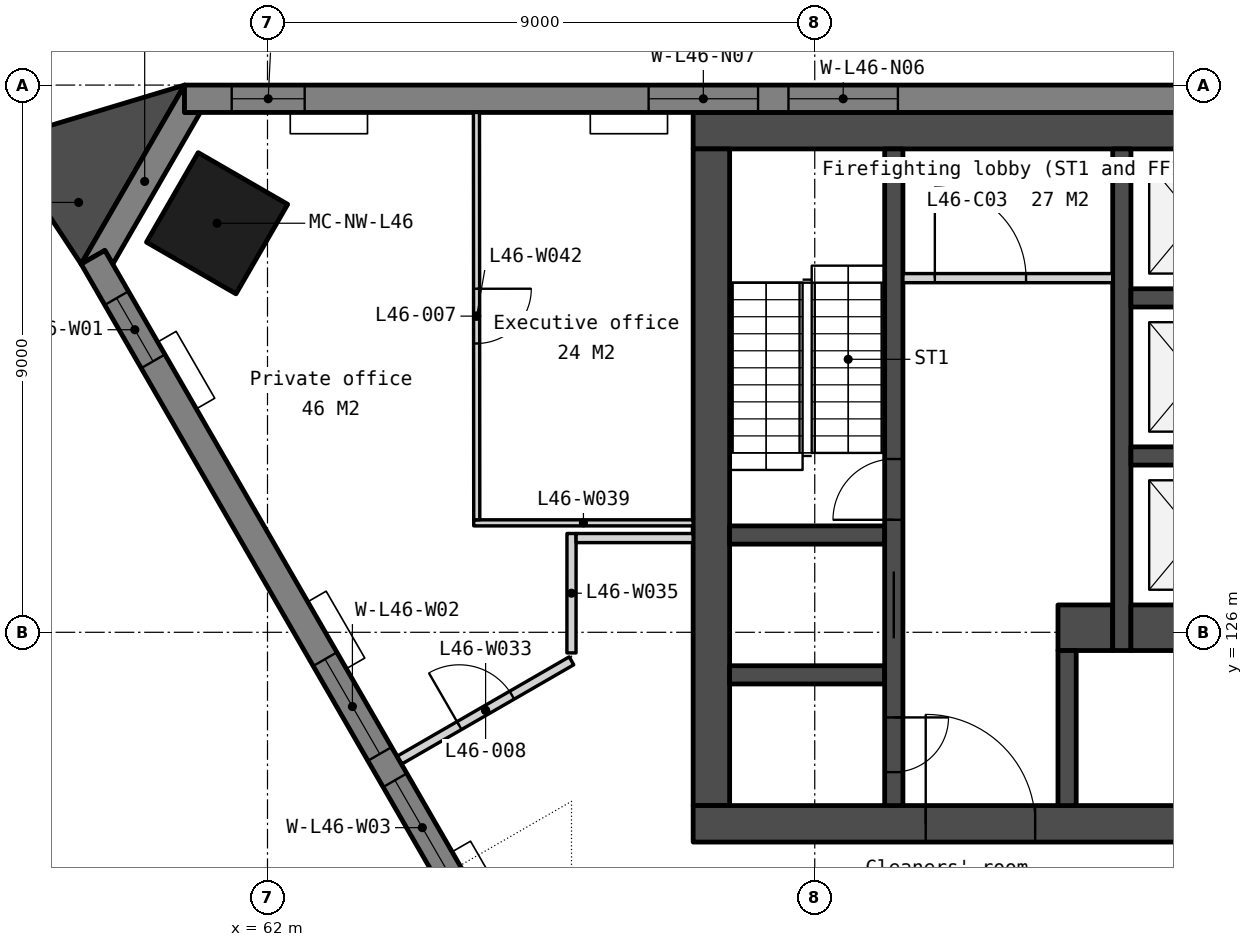
"""IFC4 building model, lengths in metres.
Left out: names, types, materials, properties, quantities, classifications, styles, units other than length and angle.
Written with IfcOpenShell. Run it as: python <this file> out.ifc"""

import sys

from ifc_helpers import new_model, si_unit, direction, frame, frame_2d, origin, origin_2d, place, context, subcontext, project, spatial, polyline, rectangle, outline, extrude, element, fill, save


model = new_model("IFC4")
c1 = context("Model", 3, precision=1e-05, world=origin(), true_north=direction((0.0, 1.0)))
c2 = subcontext(c1, "Body", "Model", "MODEL_VIEW")
j1 = project(units=[si_unit("LENGTHUNIT", "METRE"), si_unit("PLANEANGLEUNIT", "RADIAN")], contexts=[c1])
p1 = place(None, origin())
s1 = spatial("IfcSite", under=j1, at=p1, CompositionType="ELEMENT")
p2 = place(p1, origin())
s2 = spatial("IfcBuilding", under=s1, at=p2, CompositionType="ELEMENT")
p3 = place(p2, frame((0.0, 0.0, 184.1)))
s3 = spatial("IfcBuildingStorey", under=s2, at=p3, CompositionType="ELEMENT", Elevation=184.1)
p4 = place(p3, frame((61.171, 132.728, 0.0), z_axis=(0.0, 0.0, 1.0), x_axis=(-0.5, -0.866025403784, 0.0)))
e1 = element("IfcColumn", 1, at=p4, inside=s3, PredefinedType="COLUMN", context=c2, shape_type="SweptSolid", body=[
    extrude(rectangle(XDim=1.7, YDim=1.7, at=origin_2d()), origin(), (0.0, 0.0, 1.0), 3.9),
])
p5 = place(p3, frame((69.0, 134.25, 0.0), z_axis=(0.0, 0.0, 1.0), x_axis=(1.0, 0.0, 0.0)))
e2 = element("IfcWall", 2, at=p5, inside=s3, PredefinedType="SOLIDWALL", context=c2, shape_type="SweptSolid", body=[
    extrude(rectangle(XDim=22.0, YDim=0.6, at=frame_2d((11.0, 0.0))), origin(), (0.0, 0.0, 1.0), 3.75),
])
p6 = place(p3, frame((69.3, 133.95, 0.0), z_axis=(0.0, 0.0, 1.0), x_axis=(0.0, -1.0, 0.0)))
e3 = element("IfcWall", 3, at=p6, inside=s3, PredefinedType="SOLIDWALL", context=c2, shape_type="SweptSolid", body=[
    extrude(rectangle(XDim=10.8, YDim=0.6, at=frame_2d((5.4, 0.0))), origin(), (0.0, 0.0, 1.0), 3.75),
])
p7 = place(p3, frame((69.0, 122.85, 0.0), z_axis=(0.0, 0.0, 1.0), x_axis=(1.0, 0.0, 0.0)))
e4 = element("IfcWall", 4, at=p7, inside=s3, PredefinedType="SOLIDWALL", context=c2, shape_type="SweptSolid", body=[
    extrude(rectangle(XDim=22.0, YDim=0.6, at=frame_2d((11.0, 0.0))), origin(), (0.0, 0.0, 1.0), 3.75),
])
p8 = place(p7, frame((16.375, 0.0, 0.0)))
e5 = element("IfcOpeningElement", 5, at=p8, cuts=e4, PredefinedType="OPENING", context=c2, shape_type="SweptSolid", body=[
    extrude(rectangle(XDim=1.8, YDim=2.1, at=frame_2d((0.9, 1.05))), frame((0.0, 0.31, 0.0), z_axis=(0.0, -1.0, 0.0), x_axis=(1.0, 0.0, 0.0)), (0.0, 0.0, 1.0), 0.62),
])
p9 = place(p7, frame((3.825, 0.0, 0.0)))
e6 = element("IfcOpeningElement", 6, at=p9, cuts=e4, PredefinedType="OPENING", context=c2, shape_type="SweptSolid", body=[
    extrude(rectangle(XDim=1.8, YDim=2.1, at=frame_2d((0.9, 1.05))), frame((0.0, 0.31, 0.0), z_axis=(0.0, -1.0, 0.0), x_axis=(1.0, 0.0, 0.0)), (0.0, 0.0, 1.0), 0.62),
])
p10 = place(p7, frame((12.85, 0.0, 0.0)))
e7 = element("IfcOpeningElement", 7, at=p10, cuts=e4, PredefinedType="OPENING", context=c2, shape_type="SweptSolid", body=[
    extrude(rectangle(XDim=1.5, YDim=2.1, at=frame_2d((0.75, 1.05))), frame((0.0, 0.31, 0.0), z_axis=(0.0, -1.0, 0.0), x_axis=(1.0, 0.0, 0.0)), (0.0, 0.0, 1.0), 0.62),
])
for number, where, z_axis, x_axis in (
    (8, (69.6, 127.6, 0.0), (0.0, 0.0, 1.0), (1.0, 0.0, 0.0)),
    (9, (69.6, 125.3, 0.0), (0.0, 0.0, 1.0), (1.0, 0.0, 0.0)),
):
    element("IfcWall", number, at=place(p3, frame(where, z_axis=z_axis, x_axis=x_axis)), inside=s3, PredefinedType="SOLIDWALL", context=c2, shape_type="SweptSolid", body=[
        extrude(rectangle(XDim=2.55, YDim=0.3, at=frame_2d((1.275, 0.0))), origin(), (0.0, 0.0, 1.0), 3.75),
    ])
p11 = place(p3, frame((72.3, 133.95, 0.0), z_axis=(0.0, 0.0, 1.0), x_axis=(0.0, -1.0, 0.0)))
e10 = element("IfcWall", 10, at=p11, inside=s3, PredefinedType="SOLIDWALL", context=c2, shape_type="SweptSolid", body=[
    extrude(rectangle(XDim=10.8, YDim=0.3, at=frame_2d((5.4, 0.0))), origin(), (0.0, 0.0, 1.0), 3.75),
])
p12 = place(p11, frame((6.95, 0.0, 0.0)))
e11 = element("IfcOpeningElement", 11, at=p12, cuts=e10, PredefinedType="OPENING", context=c2, shape_type="SweptSolid", body=[
    extrude(rectangle(XDim=1.1, YDim=2.1, at=frame_2d((0.55, 1.05))), frame((0.0, 0.16, 0.0), z_axis=(0.0, -1.0, 0.0), x_axis=(1.0, 0.0, 0.0)), (0.0, 0.0, 1.0), 0.32),
])
p13 = place(p11, frame((9.35, 0.0, 0.0)))
e12 = element("IfcOpeningElement", 12, at=p13, cuts=e10, PredefinedType="OPENING", context=c2, shape_type="SweptSolid", body=[
    extrude(rectangle(XDim=0.9, YDim=2.1, at=frame_2d((0.45, 1.05))), frame((0.0, 0.16, 0.0), z_axis=(0.0, -1.0, 0.0), x_axis=(1.0, 0.0, 0.0)), (0.0, 0.0, 1.0), 0.32),
])
p14 = place(p11, frame((5.1, 0.0, 0.0)))
e13 = element("IfcOpeningElement", 13, at=p14, cuts=e10, PredefinedType="OPENING", context=c2, shape_type="SweptSolid", body=[
    extrude(rectangle(XDim=1.0, YDim=2.1, at=frame_2d((0.5, 1.05))), frame((0.0, 0.16, 0.0), z_axis=(0.0, -1.0, 0.0), x_axis=(1.0, 0.0, 0.0)), (0.0, 0.0, 1.0), 0.32),
])
p15 = place(p3, frame((72.45, 131.825, 0.0), z_axis=(0.0, 0.0, 1.0), x_axis=(1.0, 0.0, 0.0)))
e14 = element("IfcWall", 14, at=p15, inside=s3, PredefinedType="PARTITIONING", context=c2, shape_type="SweptSolid", body=[
    extrude(rectangle(XDim=3.45, YDim=0.15, at=frame_2d((1.725, 0.0))), origin(), (0.0, 0.0, 1.0), 3.75),
])
p16 = place(p15, frame((0.525, 0.0, 0.0)))
e15 = element("IfcOpeningElement", 15, at=p16, cuts=e14, PredefinedType="OPENING", context=c2, shape_type="SweptSolid", body=[
    extrude(rectangle(XDim=1.5, YDim=2.1, at=frame_2d((0.75, 1.05))), frame((0.0, 0.085, 0.0), z_axis=(0.0, -1.0, 0.0), x_axis=(1.0, 0.0, 0.0)), (0.0, 0.0, 1.0), 0.17),
])
p17 = place(p3, frame((75.0, 126.075, 0.0), z_axis=(0.0, 0.0, 1.0), x_axis=(1.0, 0.0, 0.0)))
e16 = element("IfcWall", 16, at=p17, inside=s3, PredefinedType="SOLIDWALL", context=c2, shape_type="SweptSolid", body=[
    extrude(rectangle(XDim=0.9, YDim=0.75, at=frame_2d((0.45, 0.0))), origin(), (0.0, 0.0, 1.0), 3.75),
])
p18 = place(p3, frame((75.15, 125.7, 0.0), z_axis=(0.0, 0.0, 1.0), x_axis=(0.0, -1.0, 0.0)))
e17 = element("IfcWall", 17, at=p18, inside=s3, PredefinedType="SOLIDWALL", context=c2, shape_type="SweptSolid", body=[
    extrude(rectangle(XDim=2.55, YDim=0.3, at=frame_2d((1.275, 0.0))), origin(), (0.0, 0.0, 1.0), 3.75),
])
p19 = place(p3, frame((76.05, 133.95, 0.0), z_axis=(0.0, 0.0, 1.0), x_axis=(0.0, -1.0, 0.0)))
e18 = element("IfcWall", 18, at=p19, inside=s3, PredefinedType="SOLIDWALL", context=c2, shape_type="SweptSolid", body=[
    extrude(rectangle(XDim=8.25, YDim=0.3, at=frame_2d((4.125, 0.0))), origin(), (0.0, 0.0, 1.0), 3.75),
])
for number, where, z_axis, x_axis in (
    (19, (76.2, 131.5, 0.0), (0.0, 0.0, 1.0), (1.0, 0.0, 0.0)),
    (20, (76.2, 128.9, 0.0), (0.0, 0.0, 1.0), (1.0, 0.0, 0.0)),
):
    element("IfcWall", number, at=place(p3, frame(where, z_axis=z_axis, x_axis=x_axis)), inside=s3, PredefinedType="SOLIDWALL", context=c2, shape_type="SweptSolid", body=[
        extrude(rectangle(XDim=2.1, YDim=0.3, at=frame_2d((1.05, 0.0))), origin(), (0.0, 0.0, 1.0), 3.75),
    ])
p20 = place(p3, frame((76.2, 126.075, 0.0), z_axis=(0.0, 0.0, 1.0), x_axis=(1.0, 0.0, 0.0)))
e21 = element("IfcWall", 21, at=p20, inside=s3, PredefinedType="SOLIDWALL", context=c2, shape_type="SweptSolid", body=[
    extrude(rectangle(XDim=2.1, YDim=0.75, at=frame_2d((1.05, 0.0))), origin(), (0.0, 0.0, 1.0), 3.75),
])
p21 = place(p3, frame((0.0, 0.0, -0.15)))
e22 = element("IfcWall", 22, at=p21, inside=s3, PredefinedType="SOLIDWALL", context=c2, shape_type="SweptSolid", body=[
    extrude(outline(polyline([(60.635, 135.0), (60.635, 134.55), (60.895, 134.55), (59.455, 132.055), (59.325, 132.281), (58.935, 132.055), (60.635, 135.0)])), origin(), (0.0, 0.0, 1.0), 3.9),
])
p22 = place(p3, frame((99.365, 134.775, -0.15), z_axis=(0.0, 0.0, 1.0), x_axis=(-1.0, 0.0, 0.0)))
e23 = element("IfcWall", 23, at=p22, inside=s3, PredefinedType="SOLIDWALL", context=c2, shape_type="SweptSolid", body=[
    extrude(outline(polyline([(38.729, 0.0), (38.729, 3.9), (0.0, 3.9), (0.0, 0.0), (38.729, 0.0)])), frame((0.0, 0.225, 0.0), z_axis=(0.0, -1.0, 0.0), x_axis=(1.0, 0.0, 0.0)), (0.0, 0.0, 1.0), 0.45),
])
p23 = place(p22, frame((0.776, 0.0, 0.95)))
e24 = element("IfcOpeningElement", 24, at=p23, cuts=e23, PredefinedType="OPENING", context=c2, shape_type="SweptSolid", body=[
    extrude(rectangle(XDim=1.2, YDim=2.2, at=frame_2d((0.6, 1.1))), frame((0.0, 0.235, 0.0), z_axis=(0.0, -1.0, 0.0), x_axis=(1.0, 0.0, 0.0)), (0.0, 0.0, 1.0), 0.47),
])
p24 = place(p22, frame((7.632, 0.0, 0.95)))
e25 = element("IfcOpeningElement", 25, at=p24, cuts=e23, PredefinedType="OPENING", context=c2, shape_type="SweptSolid", body=[
    extrude(rectangle(XDim=1.8, YDim=2.2, at=frame_2d((0.9, 1.1))), frame((0.0, 0.235, 0.0), z_axis=(0.0, -1.0, 0.0), x_axis=(1.0, 0.0, 0.0)), (0.0, 0.0, 1.0), 0.47),
])
p25 = place(p22, frame((9.932, 0.0, 0.95)))
e26 = element("IfcOpeningElement", 26, at=p25, cuts=e23, PredefinedType="OPENING", context=c2, shape_type="SweptSolid", body=[
    extrude(rectangle(XDim=1.8, YDim=2.2, at=frame_2d((0.9, 1.1))), frame((0.0, 0.235, 0.0), z_axis=(0.0, -1.0, 0.0), x_axis=(1.0, 0.0, 0.0)), (0.0, 0.0, 1.0), 0.47),
])
p26 = place(p22, frame((17.315, 0.0, 0.95)))
e27 = element("IfcOpeningElement", 27, at=p26, cuts=e23, PredefinedType="OPENING", context=c2, shape_type="SweptSolid", body=[
    extrude(rectangle(XDim=1.8, YDim=2.2, at=frame_2d((0.9, 1.1))), frame((0.0, 0.235, 0.0), z_axis=(0.0, -1.0, 0.0), x_axis=(1.0, 0.0, 0.0)), (0.0, 0.0, 1.0), 0.47),
])
p27 = place(p22, frame((19.615, 0.0, 0.95)))
e28 = element("IfcOpeningElement", 28, at=p27, cuts=e23, PredefinedType="OPENING", context=c2, shape_type="SweptSolid", body=[
    extrude(rectangle(XDim=1.8, YDim=2.2, at=frame_2d((0.9, 1.1))), frame((0.0, 0.235, 0.0), z_axis=(0.0, -1.0, 0.0), x_axis=(1.0, 0.0, 0.0)), (0.0, 0.0, 1.0), 0.47),
])
p28 = place(p22, frame((26.997, 0.0, 0.95)))
e29 = element("IfcOpeningElement", 29, at=p28, cuts=e23, PredefinedType="OPENING", context=c2, shape_type="SweptSolid", body=[
    extrude(rectangle(XDim=1.8, YDim=2.2, at=frame_2d((0.9, 1.1))), frame((0.0, 0.235, 0.0), z_axis=(0.0, -1.0, 0.0), x_axis=(1.0, 0.0, 0.0)), (0.0, 0.0, 1.0), 0.47),
])
p29 = place(p22, frame((29.297, 0.0, 0.95)))
e30 = element("IfcOpeningElement", 30, at=p29, cuts=e23, PredefinedType="OPENING", context=c2, shape_type="SweptSolid", body=[
    extrude(rectangle(XDim=1.8, YDim=2.2, at=frame_2d((0.9, 1.1))), frame((0.0, 0.235, 0.0), z_axis=(0.0, -1.0, 0.0), x_axis=(1.0, 0.0, 0.0)), (0.0, 0.0, 1.0), 0.47),
])
p30 = place(p22, frame((36.753, 0.0, 0.95)))
e31 = element("IfcOpeningElement", 31, at=p30, cuts=e23, PredefinedType="OPENING", context=c2, shape_type="SweptSolid", body=[
    extrude(rectangle(XDim=1.2, YDim=2.2, at=frame_2d((0.6, 1.1))), frame((0.0, 0.235, 0.0), z_axis=(0.0, -1.0, 0.0), x_axis=(1.0, 0.0, 0.0)), (0.0, 0.0, 1.0), 0.47),
])
p31 = place(p3, frame((59.13, 132.168, -0.15), z_axis=(0.0, 0.0, 1.0), x_axis=(0.500002199942, -0.866024133644, 0.0)))
e32 = element("IfcWall", 32, at=p31, inside=s3, PredefinedType="SOLIDWALL", context=c2, shape_type="SweptSolid", body=[
    extrude(outline(polyline([(38.729, 0.0), (38.729, 3.9), (0.0, 3.9), (0.0, 0.0), (38.729, 0.0)])), frame((0.0, 0.225, 0.0), z_axis=(0.0, -1.0, 0.0), x_axis=(1.0, 0.0, 0.0)), (0.0, 0.0, 1.0), 0.45),
])
p32 = place(p31, frame((0.776, 0.0, 0.95)))
e33 = element("IfcOpeningElement", 33, at=p32, cuts=e32, PredefinedType="OPENING", context=c2, shape_type="SweptSolid", body=[
    extrude(rectangle(XDim=1.2, YDim=2.2, at=frame_2d((0.6, 1.1))), frame((0.0, 0.235, 0.0), z_axis=(0.0, -1.0, 0.0), x_axis=(1.0, 0.0, 0.0)), (0.0, 0.0, 1.0), 0.47),
])
p33 = place(p31, frame((7.632, 0.0, 0.95)))
e34 = element("IfcOpeningElement", 34, at=p33, cuts=e32, PredefinedType="OPENING", context=c2, shape_type="SweptSolid", body=[
    extrude(rectangle(XDim=1.8, YDim=2.2, at=frame_2d((0.9, 1.1))), frame((0.0, 0.235, 0.0), z_axis=(0.0, -1.0, 0.0), x_axis=(1.0, 0.0, 0.0)), (0.0, 0.0, 1.0), 0.47),
])
p34 = place(p31, frame((9.932, 0.0, 0.95)))
e35 = element("IfcOpeningElement", 35, at=p34, cuts=e32, PredefinedType="OPENING", context=c2, shape_type="SweptSolid", body=[
    extrude(rectangle(XDim=1.8, YDim=2.2, at=frame_2d((0.9, 1.1))), frame((0.0, 0.235, 0.0), z_axis=(0.0, -1.0, 0.0), x_axis=(1.0, 0.0, 0.0)), (0.0, 0.0, 1.0), 0.47),
])
p35 = place(p31, frame((17.315, 0.0, 0.95)))
e36 = element("IfcOpeningElement", 36, at=p35, cuts=e32, PredefinedType="OPENING", context=c2, shape_type="SweptSolid", body=[
    extrude(rectangle(XDim=1.8, YDim=2.2, at=frame_2d((0.9, 1.1))), frame((0.0, 0.235, 0.0), z_axis=(0.0, -1.0, 0.0), x_axis=(1.0, 0.0, 0.0)), (0.0, 0.0, 1.0), 0.47),
])
p36 = place(p31, frame((19.615, 0.0, 0.95)))
e37 = element("IfcOpeningElement", 37, at=p36, cuts=e32, PredefinedType="OPENING", context=c2, shape_type="SweptSolid", body=[
    extrude(rectangle(XDim=1.8, YDim=2.2, at=frame_2d((0.9, 1.1))), frame((0.0, 0.235, 0.0), z_axis=(0.0, -1.0, 0.0), x_axis=(1.0, 0.0, 0.0)), (0.0, 0.0, 1.0), 0.47),
])
p37 = place(p31, frame((26.997, 0.0, 0.95)))
e38 = element("IfcOpeningElement", 38, at=p37, cuts=e32, PredefinedType="OPENING", context=c2, shape_type="SweptSolid", body=[
    extrude(rectangle(XDim=1.8, YDim=2.2, at=frame_2d((0.9, 1.1))), frame((0.0, 0.235, 0.0), z_axis=(0.0, -1.0, 0.0), x_axis=(1.0, 0.0, 0.0)), (0.0, 0.0, 1.0), 0.47),
])
p38 = place(p31, frame((29.297, 0.0, 0.95)))
e39 = element("IfcOpeningElement", 39, at=p38, cuts=e32, PredefinedType="OPENING", context=c2, shape_type="SweptSolid", body=[
    extrude(rectangle(XDim=1.8, YDim=2.2, at=frame_2d((0.9, 1.1))), frame((0.0, 0.235, 0.0), z_axis=(0.0, -1.0, 0.0), x_axis=(1.0, 0.0, 0.0)), (0.0, 0.0, 1.0), 0.47),
])
p39 = place(p31, frame((36.753, 0.0, 0.95)))
e40 = element("IfcOpeningElement", 40, at=p39, cuts=e32, PredefinedType="OPENING", context=c2, shape_type="SweptSolid", body=[
    extrude(rectangle(XDim=1.2, YDim=2.2, at=frame_2d((0.6, 1.1))), frame((0.0, 0.235, 0.0), z_axis=(0.0, -1.0, 0.0), x_axis=(1.0, 0.0, 0.0)), (0.0, 0.0, 1.0), 0.47),
])
p40 = place(p3, frame((0.0, 0.0, -0.15)))
e41 = element("IfcWall", 41, at=p40, inside=s3, PredefinedType="SOLIDWALL", context=c2, shape_type="SweptSolid", body=[
    extrude(outline(polyline([(60.635, 135.0), (57.598, 134.085), (58.935, 132.055), (60.635, 135.0)])), origin(), (0.0, 0.0, 1.0), 3.9),
])
p41 = place(p3, frame((64.175, 123.9, 0.0), z_axis=(0.0, 0.0, 1.0), x_axis=(0.866032230194, 0.499988176125, 0.0)))
e42 = element("IfcWall", 42, at=p41, inside=s3, PredefinedType="PARTITIONING", context=c2, shape_type="SweptSolid", body=[
    extrude(rectangle(XDim=3.261, YDim=0.15, at=frame_2d((1.63, 0.0))), origin(), (0.0, 0.0, 1.0), 3.75),
])
p42 = place(p41, frame((1.13, 0.0, 0.0)))
e43 = element("IfcOpeningElement", 43, at=p42, cuts=e42, PredefinedType="OPENING", context=c2, shape_type="SweptSolid", body=[
    extrude(rectangle(XDim=1.0, YDim=2.1, at=frame_2d((0.5, 1.05))), frame((0.0, 0.085, 0.0), z_axis=(0.0, -1.0, 0.0), x_axis=(1.0, 0.0, 0.0)), (0.0, 0.0, 1.0), 0.17),
])
p43 = place(p3, frame((66.999, 125.661, 0.0), z_axis=(0.0, 0.0, 1.0), x_axis=(0.00049720317, 0.999999876394, 0.0)))
e44 = element("IfcWall", 44, at=p43, inside=s3, PredefinedType="PARTITIONING", context=c2, shape_type="SweptSolid", body=[
    extrude(rectangle(XDim=1.964, YDim=0.15, at=frame_2d((0.982, 0.0))), origin(), (0.0, 0.0, 1.0), 3.75),
])
p44 = place(p3, frame((67.075, 127.55, 0.0), z_axis=(0.0, 0.0, 1.0), x_axis=(1.0, 0.0, 0.0)))
e45 = element("IfcWall", 45, at=p44, inside=s3, PredefinedType="PARTITIONING", context=c2, shape_type="SweptSolid", body=[
    extrude(rectangle(XDim=1.925, YDim=0.15, at=frame_2d((0.962, 0.0))), origin(), (0.0, 0.0, 1.0), 3.75),
])
p45 = place(p3, frame((65.392, 127.8, 0.0), z_axis=(0.0, 0.0, 1.0), x_axis=(1.0, 0.0, 0.0)))
e46 = element("IfcWall", 46, at=p45, inside=s3, PredefinedType="PARTITIONING", context=c2, shape_type="SweptSolid", body=[
    extrude(rectangle(XDim=3.608, YDim=0.1, at=frame_2d((1.804, 0.0))), origin(), (0.0, 0.0, 1.0), 3.28),
])
p46 = place(p3, frame((65.437, 134.55, 0.0), z_axis=(0.0, 0.0, 1.0), x_axis=(0.000728783103, -0.999999734438, 0.0)))
e47 = element("IfcWall", 47, at=p46, inside=s3, PredefinedType="PARTITIONING", context=c2, shape_type="SweptSolid", body=[
    extrude(rectangle(XDim=6.7, YDim=0.1, at=frame_2d((3.35, 0.0))), origin(), (0.0, 0.0, 1.0), 3.75),
])
p47 = place(p46, frame((2.9, 0.0, 0.0)))
e48 = element("IfcOpeningElement", 48, at=p47, cuts=e47, PredefinedType="OPENING", context=c2, shape_type="SweptSolid", body=[
    extrude(rectangle(XDim=0.9, YDim=2.1, at=frame_2d((0.45, 1.05))), frame((0.0, 0.06, 0.0), z_axis=(0.0, -1.0, 0.0), x_axis=(1.0, 0.0, 0.0)), (0.0, 0.0, 1.0), 0.12),
])
p48 = place(p12, origin())
e49 = element("IfcDoor", 49, at=p48, inside=s3, OperationType="SLIDING_TO_LEFT", PredefinedType="DOOR", context=c2, shape_type="SweptSolid", body=[
    extrude(rectangle(XDim=1.1, YDim=2.1, at=frame_2d((0.55, 1.05))), frame((0.0, 0.025, 0.0), z_axis=(0.0, -1.0, 0.0), x_axis=(1.0, 0.0, 0.0)), (0.0, 0.0, 1.0), 0.05),
])
fill(e11, e49)
p49 = place(p9, origin())
e50 = element("IfcDoor", 50, at=p49, inside=s3, OperationType="DOUBLE_DOOR_DOUBLE_SWING", PredefinedType="DOOR", context=c2, shape_type="SweptSolid", body=[
    extrude(rectangle(XDim=1.8, YDim=2.1, at=frame_2d((0.9, 1.05))), frame((0.0, 0.025, 0.0), z_axis=(0.0, -1.0, 0.0), x_axis=(1.0, 0.0, 0.0)), (0.0, 0.0, 1.0), 0.05),
])
fill(e6, e50)
p50 = place(p16, origin())
e51 = element("IfcDoor", 51, at=p50, inside=s3, OperationType="DOUBLE_DOOR_DOUBLE_SWING", PredefinedType="DOOR", context=c2, shape_type="SweptSolid", body=[
    extrude(rectangle(XDim=1.5, YDim=2.1, at=frame_2d((0.75, 1.05))), frame((0.0, 0.025, 0.0), z_axis=(0.0, -1.0, 0.0), x_axis=(1.0, 0.0, 0.0)), (0.0, 0.0, 1.0), 0.05),
])
fill(e15, e51)
p51 = place(p13, origin())
e52 = element("IfcDoor", 52, at=p51, inside=s3, OperationType="SINGLE_SWING_LEFT", PredefinedType="DOOR", context=c2, shape_type="SweptSolid", body=[
    extrude(rectangle(XDim=0.9, YDim=2.1, at=frame_2d((0.45, 1.05))), frame((0.0, 0.025, 0.0), z_axis=(0.0, -1.0, 0.0), x_axis=(1.0, 0.0, 0.0)), (0.0, 0.0, 1.0), 0.05),
])
fill(e12, e52)
p52 = place(p14, origin())
e53 = element("IfcDoor", 53, at=p52, inside=s3, OperationType="SINGLE_SWING_RIGHT", PredefinedType="DOOR", context=c2, shape_type="SweptSolid", body=[
    extrude(rectangle(XDim=1.0, YDim=2.1, at=frame_2d((0.5, 1.05))), frame((0.0, 0.025, 0.0), z_axis=(0.0, -1.0, 0.0), x_axis=(1.0, 0.0, 0.0)), (0.0, 0.0, 1.0), 0.05),
])
fill(e13, e53)
p53 = place(p28, origin())
e54 = element("IfcWindow", 54, at=p53, inside=s3, PartitioningType="SINGLE_PANEL", PredefinedType="WINDOW", context=c2, shape_type="SweptSolid", body=[
    extrude(rectangle(XDim=1.8, YDim=2.2, at=frame_2d((0.9, 1.1))), frame((0.0, 0.03, 0.0), z_axis=(0.0, -1.0, 0.0), x_axis=(1.0, 0.0, 0.0)), (0.0, 0.0, 1.0), 0.06),
])
fill(e29, e54)
p54 = place(p29, origin())
e55 = element("IfcWindow", 55, at=p54, inside=s3, PartitioningType="SINGLE_PANEL", PredefinedType="WINDOW", context=c2, shape_type="SweptSolid", body=[
    extrude(rectangle(XDim=1.8, YDim=2.2, at=frame_2d((0.9, 1.1))), frame((0.0, 0.03, 0.0), z_axis=(0.0, -1.0, 0.0), x_axis=(1.0, 0.0, 0.0)), (0.0, 0.0, 1.0), 0.06),
])
fill(e30, e55)
p55 = place(p30, origin())
e56 = element("IfcWindow", 56, at=p55, inside=s3, PartitioningType="SINGLE_PANEL", PredefinedType="WINDOW", context=c2, shape_type="SweptSolid", body=[
    extrude(rectangle(XDim=1.2, YDim=2.2, at=frame_2d((0.6, 1.1))), frame((0.0, 0.03, 0.0), z_axis=(0.0, -1.0, 0.0), x_axis=(1.0, 0.0, 0.0)), (0.0, 0.0, 1.0), 0.06),
])
fill(e31, e56)
p56 = place(p32, origin())
e57 = element("IfcWindow", 57, at=p56, inside=s3, PartitioningType="SINGLE_PANEL", PredefinedType="WINDOW", context=c2, shape_type="SweptSolid", body=[
    extrude(rectangle(XDim=1.2, YDim=2.2, at=frame_2d((0.6, 1.1))), frame((0.0, 0.03, 0.0), z_axis=(0.0, -1.0, 0.0), x_axis=(1.0, 0.0, 0.0)), (0.0, 0.0, 1.0), 0.06),
])
fill(e33, e57)
p57 = place(p33, origin())
e58 = element("IfcWindow", 58, at=p57, inside=s3, PartitioningType="SINGLE_PANEL", PredefinedType="WINDOW", context=c2, shape_type="SweptSolid", body=[
    extrude(rectangle(XDim=1.8, YDim=2.2, at=frame_2d((0.9, 1.1))), frame((0.0, 0.03, 0.0), z_axis=(0.0, -1.0, 0.0), x_axis=(1.0, 0.0, 0.0)), (0.0, 0.0, 1.0), 0.06),
])
fill(e34, e58)
p58 = place(p34, origin())
e59 = element("IfcWindow", 59, at=p58, inside=s3, PartitioningType="SINGLE_PANEL", PredefinedType="WINDOW", context=c2, shape_type="SweptSolid", body=[
    extrude(rectangle(XDim=1.8, YDim=2.2, at=frame_2d((0.9, 1.1))), frame((0.0, 0.03, 0.0), z_axis=(0.0, -1.0, 0.0), x_axis=(1.0, 0.0, 0.0)), (0.0, 0.0, 1.0), 0.06),
])
fill(e35, e59)
p59 = place(p47, origin())
e60 = element("IfcDoor", 60, at=p59, inside=s3, OperationType="SINGLE_SWING_LEFT", PredefinedType="DOOR", context=c2, shape_type="SweptSolid", body=[
    extrude(rectangle(XDim=0.9, YDim=2.1, at=frame_2d((0.45, 1.05))), frame((0.0, 0.025, 0.0), z_axis=(0.0, -1.0, 0.0), x_axis=(1.0, 0.0, 0.0)), (0.0, 0.0, 1.0), 0.05),
])
fill(e48, e60)
p60 = place(p42, origin())
e61 = element("IfcDoor", 61, at=p60, inside=s3, OperationType="SINGLE_SWING_LEFT", PredefinedType="DOOR", context=c2, shape_type="SweptSolid", body=[
    extrude(rectangle(XDim=1.0, YDim=2.1, at=frame_2d((0.5, 1.05))), frame((0.0, 0.025, 0.0), z_axis=(0.0, -1.0, 0.0), x_axis=(1.0, 0.0, 0.0)), (0.0, 0.0, 1.0), 0.05),
])
fill(e43, e61)
save(model, sys.argv[1])
